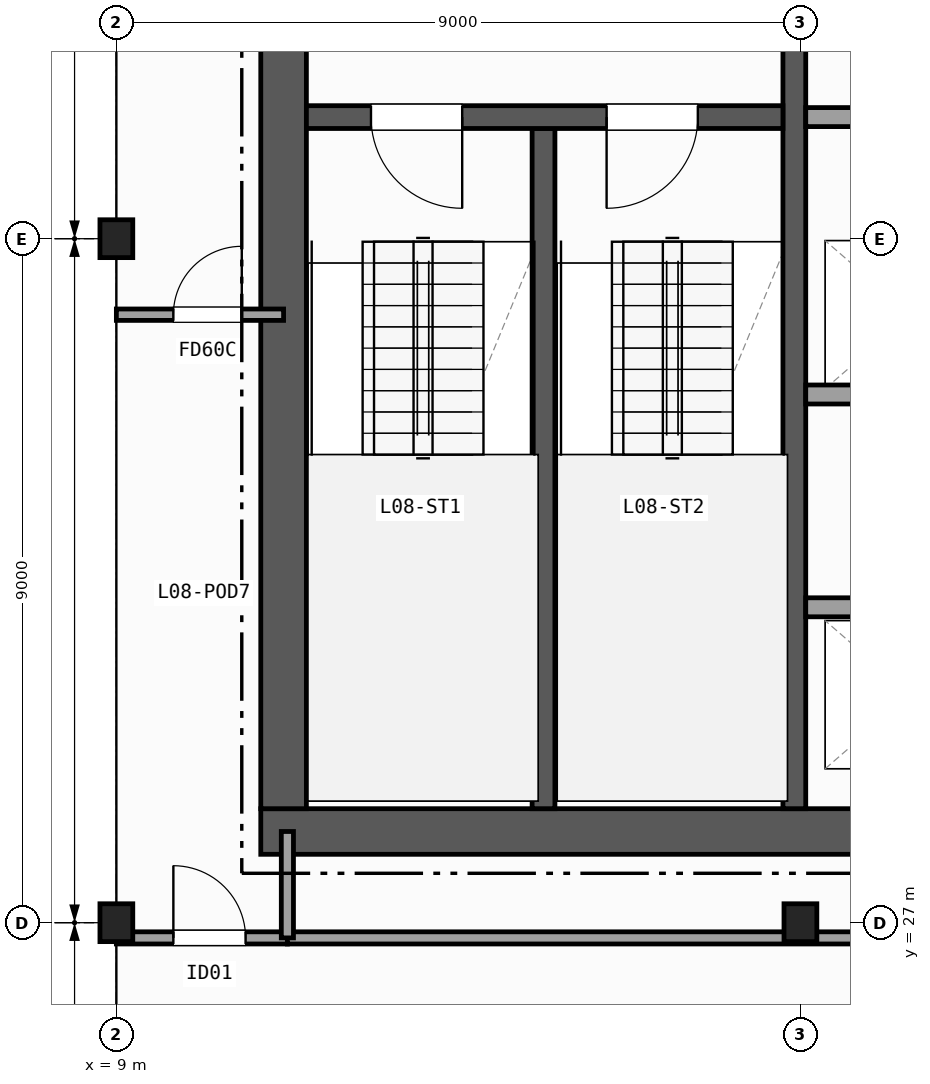
"""IFC4 building model, lengths in metres.
Left out: names, types, materials, properties, quantities, classifications, styles, units other than length and angle.
Written with IfcOpenShell. Run it as: python <this file> out.ifc"""

import sys

from ifc_helpers import new_model, si_unit, direction, frame, frame_2d, origin, origin_2d, place, context, subcontext, project, spatial, rectangle, i_section, extrude, element, fill, save


model = new_model("IFC4")
c1 = context("Model", 3, precision=1e-05, world=origin(), true_north=direction((0.0, 1.0)))
c2 = subcontext(c1, "Body", "Model", "MODEL_VIEW")
j1 = project(units=[si_unit("LENGTHUNIT", "METRE"), si_unit("PLANEANGLEUNIT", "RADIAN")], contexts=[c1])
p1 = place(None, origin())
s1 = spatial("IfcSite", under=j1, at=p1, CompositionType="ELEMENT")
p2 = place(p1, origin())
s2 = spatial("IfcBuilding", under=s1, at=p2, CompositionType="ELEMENT")
p3 = place(p2, frame((0.0, 0.0, 39.7)))
s3 = spatial("IfcBuildingStorey", under=s2, at=p3, CompositionType="ELEMENT", Elevation=39.7)
for number, where, z_axis, x_axis in (
    (1, (9.0, 27.0, 0.0), (0.0, 0.0, 1.0), (1.0, 0.0, 0.0)),
    (2, (9.0, 36.0, 0.0), (0.0, 0.0, 1.0), (1.0, 0.0, 0.0)),
    (3, (18.0, 27.0, 0.0), (0.0, 0.0, 1.0), (1.0, 0.0, 0.0)),
):
    element("IfcColumn", number, at=place(p3, frame(where, z_axis=z_axis, x_axis=x_axis)), inside=s3, PredefinedType="COLUMN", context=c2, shape_type="SweptSolid", body=[
        extrude(i_section(OverallWidth=0.432, OverallDepth=0.498, WebThickness=0.056, FlangeThickness=0.089, FilletRadius=0.015, at=origin_2d()), origin(), (0.0, 0.0, 1.0), 3.7),
    ])
p4 = place(p3, frame((10.9, 28.2, 0.0), z_axis=(0.0, 0.0, 1.0), x_axis=(1.0, 0.0, 0.0)))
e4 = element("IfcWall", 4, at=p4, inside=s3, PredefinedType="SHEAR", context=c2, shape_type="SweptSolid", body=[
    extrude(rectangle(XDim=14.0, YDim=0.6, at=frame_2d((7.0, 0.0))), origin(), (0.0, 0.0, 1.0), 3.42),
])
p5 = place(p3, frame((11.2, 42.1, 0.0), z_axis=(0.0, 0.0, 1.0), x_axis=(0.0, -1.0, 0.0)))
e5 = element("IfcWall", 5, at=p5, inside=s3, PredefinedType="SHEAR", context=c2, shape_type="SweptSolid", body=[
    extrude(rectangle(XDim=13.6, YDim=0.6, at=frame_2d((6.8, 0.0))), origin(), (0.0, 0.0, 1.0), 3.42),
])
p6 = place(p3, frame((14.62, 28.5, 0.0), z_axis=(0.0, 0.0, 1.0), x_axis=(0.0, 1.0, 0.0)))
e6 = element("IfcWall", 6, at=p6, inside=s3, PredefinedType="SHEAR", context=c2, shape_type="SweptSolid", body=[
    extrude(rectangle(XDim=8.95, YDim=0.3, at=frame_2d((4.475, 0.0))), origin(), (0.0, 0.0, 1.0), 3.42),
])
p7 = place(p3, frame((17.92, 42.1, 0.0), z_axis=(0.0, 0.0, 1.0), x_axis=(0.0, -1.0, 0.0)))
e7 = element("IfcWall", 7, at=p7, inside=s3, PredefinedType="SHEAR", context=c2, shape_type="SweptSolid", body=[
    extrude(rectangle(XDim=13.6, YDim=0.3, at=frame_2d((6.8, 0.0))), origin(), (0.0, 0.0, 1.0), 3.42),
])
p8 = place(p7, frame((1.925, 0.0, 0.0)))
e8 = element("IfcOpeningElement", 8, at=p8, cuts=e7, PredefinedType="OPENING", context=c2, shape_type="SweptSolid", body=[
    extrude(rectangle(XDim=1.15, YDim=2.15, at=frame_2d((0.575, 1.075))), frame((0.0, 0.16, 0.0), z_axis=(0.0, -1.0, 0.0), x_axis=(1.0, 0.0, 0.0)), (0.0, 0.0, 1.0), 0.32),
])
p9 = place(p3, frame((17.77, 37.6, 0.0), z_axis=(0.0, 0.0, 1.0), x_axis=(-1.0, 0.0, 0.0)))
e9 = element("IfcWall", 9, at=p9, inside=s3, PredefinedType="SHEAR", context=c2, shape_type="SweptSolid", body=[
    extrude(rectangle(XDim=6.27, YDim=0.3, at=frame_2d((3.135, 0.0))), origin(), (0.0, 0.0, 1.0), 3.42),
])
p10 = place(p9, frame((4.22, 0.0, 0.0)))
e10 = element("IfcOpeningElement", 10, at=p10, cuts=e9, PredefinedType="OPENING", context=c2, shape_type="SweptSolid", body=[
    extrude(rectangle(XDim=1.2, YDim=2.15, at=frame_2d((0.6, 1.075))), frame((0.0, 0.16, 0.0), z_axis=(0.0, -1.0, 0.0), x_axis=(1.0, 0.0, 0.0)), (0.0, 0.0, 1.0), 0.32),
])
p11 = place(p9, frame((1.12, 0.0, 0.0)))
e11 = element("IfcOpeningElement", 11, at=p11, cuts=e9, PredefinedType="OPENING", context=c2, shape_type="SweptSolid", body=[
    extrude(rectangle(XDim=1.2, YDim=2.15, at=frame_2d((0.6, 1.075))), frame((0.0, 0.16, 0.0), z_axis=(0.0, -1.0, 0.0), x_axis=(1.0, 0.0, 0.0)), (0.0, 0.0, 1.0), 0.32),
])
for number, where, z_axis, x_axis in (
    (12, (18.07, 37.6, 0.0), (0.0, 0.0, 1.0), (1.0, 0.0, 0.0)),
    (13, (18.07, 31.15, 0.0), (0.0, 0.0, 1.0), (1.0, 0.0, 0.0)),
    (14, (24.3, 33.95, 0.0), (0.0, 0.0, 1.0), (-1.0, 0.0, 0.0)),
):
    element("IfcWall", number, at=place(p3, frame(where, z_axis=z_axis, x_axis=x_axis)), inside=s3, PredefinedType="PARTITIONING", context=c2, shape_type="SweptSolid", body=[
        extrude(rectangle(XDim=6.23, YDim=0.25, at=frame_2d((3.115, 0.0))), origin(), (0.0, 0.0, 1.0), 3.42),
    ])
p12 = place(p3, frame((9.0, 26.8, 0.0), z_axis=(0.0, 0.0, 1.0), x_axis=(1.0, 0.0, 0.0)))
e15 = element("IfcWall", 15, at=p12, inside=s3, PredefinedType="PARTITIONING", context=c2, shape_type="SweptSolid", body=[
    extrude(rectangle(XDim=2.25, YDim=0.16, at=frame_2d((1.125, 0.0))), origin(), (0.0, 0.0, 1.0), 2.627),
])
p13 = place(p12, frame((0.75, 0.0, 0.0)))
e16 = element("IfcOpeningElement", 16, at=p13, cuts=e15, PredefinedType="OPENING", context=c2, shape_type="SweptSolid", body=[
    extrude(rectangle(XDim=0.95, YDim=2.1, at=frame_2d((0.475, 1.05))), frame((0.0, 0.09, 0.0), z_axis=(0.0, -1.0, 0.0), x_axis=(1.0, 0.0, 0.0)), (0.0, 0.0, 1.0), 0.18),
])
p14 = place(p3, frame((9.0, 35.0, 0.0), z_axis=(0.0, 0.0, 1.0), x_axis=(1.0, 0.0, 0.0)))
e17 = element("IfcWall", 17, at=p14, inside=s3, PredefinedType="PARTITIONING", context=c2, shape_type="SweptSolid", body=[
    extrude(rectangle(XDim=2.2, YDim=0.15, at=frame_2d((1.1, 0.0))), origin(), (0.0, 0.0, 1.0), 2.627),
])
p15 = place(p14, frame((0.75, 0.0, 0.0)))
e18 = element("IfcOpeningElement", 18, at=p15, cuts=e17, PredefinedType="OPENING", context=c2, shape_type="SweptSolid", body=[
    extrude(rectangle(XDim=0.9, YDim=2.1, at=frame_2d((0.45, 1.05))), frame((0.0, 0.085, 0.0), z_axis=(0.0, -1.0, 0.0), x_axis=(1.0, 0.0, 0.0)), (0.0, 0.0, 1.0), 0.17),
])
p16 = place(p3, frame((11.25, 26.8, 0.0), z_axis=(0.0, 0.0, 1.0), x_axis=(1.0, 0.0, 0.0)))
e19 = element("IfcWall", 19, at=p16, inside=s3, PredefinedType="PARTITIONING", context=c2, shape_type="SweptSolid", body=[
    extrude(rectangle(XDim=13.4, YDim=0.16, at=frame_2d((6.7, 0.0))), origin(), (0.0, 0.0, 1.0), 2.789),
])
p17 = place(p16, frame((9.5, 0.0, 0.0)))
e20 = element("IfcOpeningElement", 20, at=p17, cuts=e19, PredefinedType="OPENING", context=c2, shape_type="SweptSolid", body=[
    extrude(rectangle(XDim=1.05, YDim=2.15, at=frame_2d((0.525, 1.075))), frame((0.0, 0.09, 0.0), z_axis=(0.0, -1.0, 0.0), x_axis=(1.0, 0.0, 0.0)), (0.0, 0.0, 1.0), 0.18),
])
p18 = place(p3, frame((11.25, 26.8, 0.0), z_axis=(0.0, 0.0, 1.0), x_axis=(0.0, 1.0, 0.0)))
e21 = element("IfcWall", 21, at=p18, inside=s3, PredefinedType="PARTITIONING", context=c2, shape_type="SweptSolid", body=[
    extrude(rectangle(XDim=1.4, YDim=0.16, at=frame_2d((0.7, 0.0))), origin(), (0.0, 0.0, 1.0), 2.789),
])
p19 = place(p10, origin())
e22 = element("IfcDoor", 22, at=p19, inside=s3, OperationType="SINGLE_SWING_LEFT", PredefinedType="DOOR", context=c2, shape_type="SweptSolid", body=[
    extrude(rectangle(XDim=1.2, YDim=2.15, at=frame_2d((0.6, 1.075))), frame((0.0, 0.025, 0.0), z_axis=(0.0, -1.0, 0.0), x_axis=(1.0, 0.0, 0.0)), (0.0, 0.0, 1.0), 0.05),
])
fill(e10, e22)
p20 = place(p11, origin())
e23 = element("IfcDoor", 23, at=p20, inside=s3, OperationType="SINGLE_SWING_RIGHT", PredefinedType="DOOR", context=c2, shape_type="SweptSolid", body=[
    extrude(rectangle(XDim=1.2, YDim=2.15, at=frame_2d((0.6, 1.075))), frame((0.0, 0.025, 0.0), z_axis=(0.0, -1.0, 0.0), x_axis=(1.0, 0.0, 0.0)), (0.0, 0.0, 1.0), 0.05),
])
fill(e11, e23)
p21 = place(p13, origin())
e24 = element("IfcDoor", 24, at=p21, inside=s3, OperationType="SINGLE_SWING_LEFT", PredefinedType="DOOR", context=c2, shape_type="SweptSolid", body=[
    extrude(rectangle(XDim=0.95, YDim=2.1, at=frame_2d((0.475, 1.05))), frame((0.0, 0.025, 0.0), z_axis=(0.0, -1.0, 0.0), x_axis=(1.0, 0.0, 0.0)), (0.0, 0.0, 1.0), 0.05),
])
fill(e16, e24)
p22 = place(p15, origin())
e25 = element("IfcDoor", 25, at=p22, inside=s3, OperationType="SINGLE_SWING_RIGHT", PredefinedType="DOOR", context=c2, shape_type="SweptSolid", body=[
    extrude(rectangle(XDim=0.9, YDim=2.1, at=frame_2d((0.45, 1.05))), frame((0.0, 0.025, 0.0), z_axis=(0.0, -1.0, 0.0), x_axis=(1.0, 0.0, 0.0)), (0.0, 0.0, 1.0), 0.05),
])
fill(e18, e25)
save(model, sys.argv[1])
